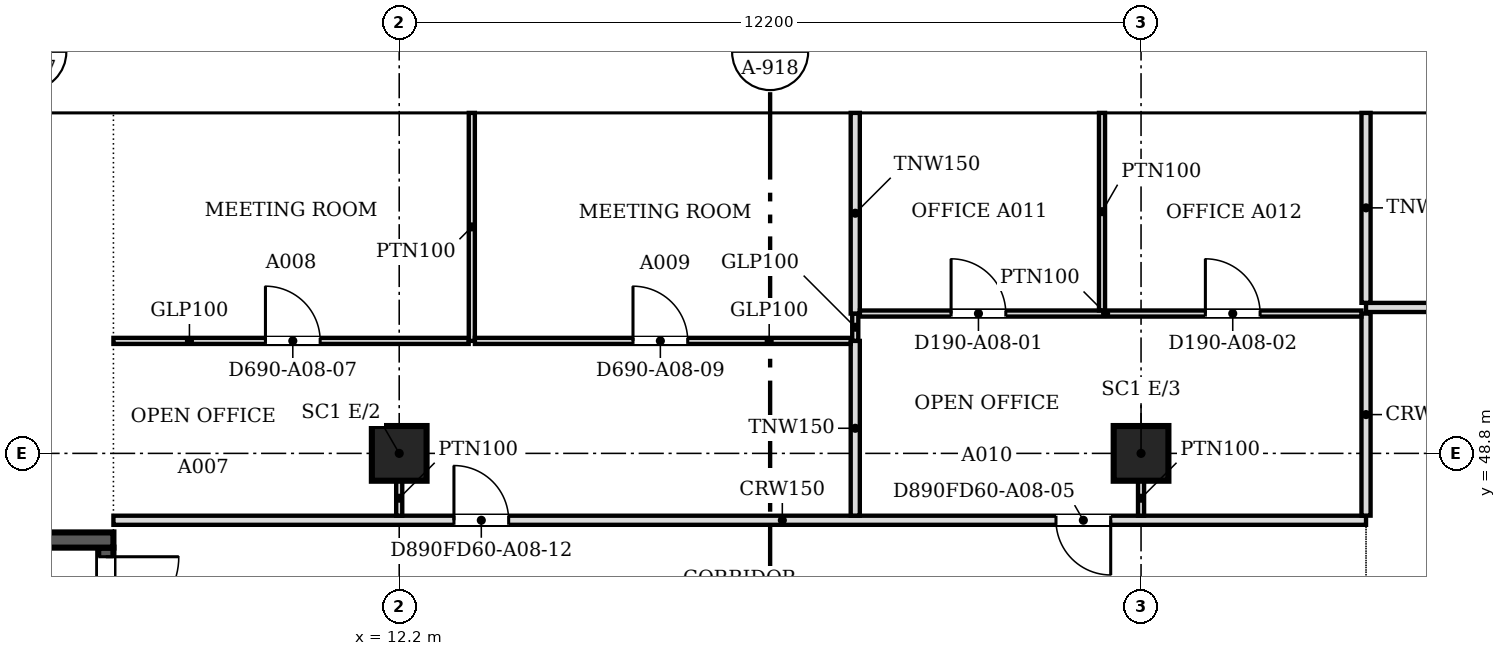
"""IFC4 building model, lengths in metres.
Left out: names, types, materials, properties, quantities, classifications, styles, units other than length and angle.
Written with IfcOpenShell. Run it as: python <this file> out.ifc"""

import sys

from ifc_helpers import new_model, si_unit, direction, frame, frame_2d, origin, origin_2d, place, context, subcontext, project, spatial, polyline, rectangle, outline, extrude, faceted_brep, source, transform, mapped, element, fill, save


model = new_model("IFC4")
c1 = context("Model", 3, precision=1e-05, world=origin(), true_north=direction((0.0, 1.0)))
c2 = subcontext(c1, "Body", "Model", "MODEL_VIEW")
j1 = project(units=[si_unit("LENGTHUNIT", "METRE"), si_unit("PLANEANGLEUNIT", "RADIAN")], contexts=[c1])
p1 = place(None, origin())
s1 = spatial("IfcSite", under=j1, at=p1, CompositionType="ELEMENT")
p2 = place(p1, origin())
s2 = spatial("IfcBuilding", under=s1, at=p2, CompositionType="ELEMENT")
p3 = place(p2, frame((0.0, 0.0, 95.2)))
s3 = spatial("IfcBuildingStorey", under=s2, at=p3, CompositionType="ELEMENT", Elevation=95.2)
for number, where, z_axis, x_axis in (
    (1, (12.2, 48.8, 0.0), (0.0, 0.0, 1.0), (1.0, 0.0, 0.0)),
    (2, (24.4, 48.8, 0.0), (0.0, 0.0, 1.0), (1.0, 0.0, 0.0)),
):
    element("IfcColumn", number, at=place(p3, frame(where, z_axis=z_axis, x_axis=x_axis)), inside=s3, PredefinedType="COLUMN", context=c2, shape_type="SweptSolid", body=[
        extrude(rectangle(XDim=0.9, YDim=0.9, at=origin_2d()), origin(), (0.0, 0.0, 1.0), 3.6),
    ])
m1 = source(origin(), c2, "Body", "SweptSolid", [
    extrude(outline(polyline([(3.05, 0.0), (6.1, 3.8), (3.05, 7.6), (0.0, 3.8), (3.05, 0.0)])), frame((0.0, 0.25, 0.0), z_axis=(0.0, -1.0, 0.0), x_axis=(1.0, 0.0, 0.0)), (0.0, 0.0, 1.0), 0.5),
])
p4 = place(p3, frame((30.5, 54.65, -3.8), z_axis=(0.0, 0.0, 1.0), x_axis=(-1.0, 0.0, 0.0)))
e3 = element("IfcWall", 3, at=p4, inside=s3, PredefinedType="SOLIDWALL", context=c2, shape_type="MappedRepresentation", body=[
    mapped(m1, transform((0.0, 0.0, 0.0), scale=1.0)),
])
m2 = source(origin(), c2, "Body", "SweptSolid", [
    extrude(outline(polyline([(3.05, 0.399), (5.78, 3.8), (3.05, 7.201), (0.321, 3.8), (3.05, 0.399)])), frame((0.0, 0.26, 0.0), z_axis=(0.0, -1.0, 0.0), x_axis=(1.0, 0.0, 0.0)), (0.0, 0.0, 1.0), 0.52),
])
p5 = place(p4, origin())
e4 = element("IfcOpeningElement", 4, at=p5, cuts=e3, PredefinedType="OPENING", context=c2, shape_type="MappedRepresentation", body=[
    mapped(m2, transform((0.0, 0.0, 0.0), scale=1.0)),
])
m3 = source(origin(), c2, "Body", "Brep", [
    faceted_brep([(3.05, -0.25, 0.0), (6.1, -0.25, 3.8), (6.1, -0.25, 3.8), (3.05, -0.25, 7.6), (0.0, -0.25, 3.8), (0.0, 0.25, 3.8), (3.05, 0.25, 7.6), (6.1, 0.25, 3.8), (6.1, 0.25, 3.8), (3.05, 0.25, 0.0)], [[[0, 1, 2, 3, 4]], [[5, 6, 7, 8, 9]], [[9, 8, 1, 0]], [[7, 6, 3, 2]], [[6, 5, 4, 3]], [[5, 9, 0, 4]], [[1, 8, 7, 2]]]),
])
p6 = place(p3, frame((24.4, 54.65, -3.8), z_axis=(0.0, 0.0, 1.0), x_axis=(-1.0, 0.0, 0.0)))
e5 = element("IfcWall", 5, at=p6, inside=s3, PredefinedType="SOLIDWALL", context=c2, shape_type="MappedRepresentation", body=[
    mapped(m3, transform((0.0, 0.0, 0.0), scale=1.0)),
])
p7 = place(p6, origin())
e6 = element("IfcOpeningElement", 6, at=p7, cuts=e5, PredefinedType="OPENING", context=c2, shape_type="MappedRepresentation", body=[
    mapped(m2, transform((0.0, 0.0, 0.0), scale=1.0)),
])
p8 = place(p3, frame((18.3, 54.65, -3.8), z_axis=(0.0, 0.0, 1.0), x_axis=(-1.0, 0.0, 0.0)))
e7 = element("IfcWall", 7, at=p8, inside=s3, PredefinedType="SOLIDWALL", context=c2, shape_type="MappedRepresentation", body=[
    mapped(m1, transform((0.0, 0.0, 0.0), scale=1.0)),
])
p9 = place(p8, origin())
e8 = element("IfcOpeningElement", 8, at=p9, cuts=e7, PredefinedType="OPENING", context=c2, shape_type="MappedRepresentation", body=[
    mapped(m2, transform((0.0, 0.0, 0.0), scale=1.0)),
])
m4 = source(origin(), c2, "Body", "Brep", [
    faceted_brep([(3.05, -0.25, 0.0), (6.053, -0.25, 3.8), (3.05, -0.25, 7.6), (0.0, -0.25, 3.8), (0.0, 0.25, 3.8), (3.05, 0.25, 7.6), (6.007, 0.25, 3.859), (6.007, 0.25, 3.741), (3.05, 0.25, 0.0), (6.053, 0.0, 3.8)], [[[0, 1, 2, 3]], [[4, 5, 6, 7, 8]], [[8, 7, 9, 1, 0]], [[6, 5, 2, 1, 9]], [[5, 4, 3, 2]], [[4, 8, 0, 3]], [[9, 7, 6]]]),
])
p10 = place(p3, frame((12.2, 54.65, -3.8), z_axis=(0.0, 0.0, 1.0), x_axis=(-1.0, 0.0, 0.0)))
e9 = element("IfcWall", 9, at=p10, inside=s3, PredefinedType="SOLIDWALL", context=c2, shape_type="MappedRepresentation", body=[
    mapped(m4, transform((0.0, 0.0, 0.0), scale=1.0)),
])
m5 = source(origin(), c2, "Body", "SweptSolid", [
    extrude(outline(polyline([(3.049, 0.401), (5.735, 3.8), (3.049, 7.199), (0.321, 3.8), (3.049, 0.401)])), frame((0.0, 0.26, 0.0), z_axis=(0.0, -1.0, 0.0), x_axis=(1.0, 0.0, 0.0)), (0.0, 0.0, 1.0), 0.52),
])
p11 = place(p10, origin())
e10 = element("IfcOpeningElement", 10, at=p11, cuts=e9, PredefinedType="OPENING", context=c2, shape_type="MappedRepresentation", body=[
    mapped(m5, transform((0.0, 0.0, 0.0), scale=1.0)),
])
p12 = place(p2, frame((0.0, 0.0, 99.0)))
s4 = spatial("IfcBuildingStorey", under=s2, at=p12, CompositionType="ELEMENT", Elevation=99.0)
p13 = place(p12, frame((33.55, 54.65, -3.8), z_axis=(0.0, 0.0, 1.0), x_axis=(-1.0, 0.0, 0.0)))
e11 = element("IfcWall", 11, at=p13, inside=s4, PredefinedType="SOLIDWALL", context=c2, shape_type="MappedRepresentation", body=[
    mapped(m1, transform((0.0, 0.0, 0.0), scale=1.0)),
])
p14 = place(p13, origin())
e12 = element("IfcOpeningElement", 12, at=p14, cuts=e11, PredefinedType="OPENING", context=c2, shape_type="MappedRepresentation", body=[
    mapped(m2, transform((0.0, 0.0, 0.0), scale=1.0)),
])
p15 = place(p12, frame((27.45, 54.65, -3.8), z_axis=(0.0, 0.0, 1.0), x_axis=(-1.0, 0.0, 0.0)))
e13 = element("IfcWall", 13, at=p15, inside=s4, PredefinedType="SOLIDWALL", context=c2, shape_type="MappedRepresentation", body=[
    mapped(m3, transform((0.0, 0.0, 0.0), scale=1.0)),
])
p16 = place(p15, origin())
e14 = element("IfcOpeningElement", 14, at=p16, cuts=e13, PredefinedType="OPENING", context=c2, shape_type="MappedRepresentation", body=[
    mapped(m2, transform((0.0, 0.0, 0.0), scale=1.0)),
])
p17 = place(p12, frame((21.35, 54.65, -3.8), z_axis=(0.0, 0.0, 1.0), x_axis=(-1.0, 0.0, 0.0)))
e15 = element("IfcWall", 15, at=p17, inside=s4, PredefinedType="SOLIDWALL", context=c2, shape_type="MappedRepresentation", body=[
    mapped(m1, transform((0.0, 0.0, 0.0), scale=1.0)),
])
p18 = place(p17, origin())
e16 = element("IfcOpeningElement", 16, at=p18, cuts=e15, PredefinedType="OPENING", context=c2, shape_type="MappedRepresentation", body=[
    mapped(m2, transform((0.0, 0.0, 0.0), scale=1.0)),
])
p19 = place(p12, frame((15.25, 54.65, -3.8), z_axis=(0.0, 0.0, 1.0), x_axis=(-1.0, 0.0, 0.0)))
e17 = element("IfcWall", 17, at=p19, inside=s4, PredefinedType="SOLIDWALL", context=c2, shape_type="MappedRepresentation", body=[
    mapped(m1, transform((0.0, 0.0, 0.0), scale=1.0)),
])
p20 = place(p19, origin())
e18 = element("IfcOpeningElement", 18, at=p20, cuts=e17, PredefinedType="OPENING", context=c2, shape_type="MappedRepresentation", body=[
    mapped(m2, transform((0.0, 0.0, 0.0), scale=1.0)),
])
m6 = source(origin(), c2, "Body", "Brep", [
    faceted_brep([(3.003, -0.25, 0.0), (3.05, -0.25, 0.06), (3.05, -0.25, 7.54), (3.003, -0.25, 7.6), (0.0, -0.25, 3.8), (0.0, 0.25, 3.8), (2.957, 0.25, 7.541), (2.957, 0.25, 0.059), (3.003, 0.0, 0.0), (3.003, 0.0, 7.6)], [[[0, 1, 2, 3, 4]], [[5, 6, 7]], [[1, 0, 8]], [[9, 3, 2]], [[6, 5, 4, 3, 9]], [[5, 7, 8, 0, 4]], [[1, 8, 7, 6, 9, 2]]]),
])
p21 = place(p12, frame((9.15, 54.65, -3.8), z_axis=(0.0, 0.0, 1.0), x_axis=(-1.0, 0.0, 0.0)))
e19 = element("IfcWall", 19, at=p21, inside=s4, PredefinedType="SOLIDWALL", context=c2, shape_type="MappedRepresentation", body=[
    mapped(m6, transform((0.0, 0.0, 0.0), scale=1.0)),
])
m7 = source(origin(), c2, "Body", "SweptSolid", [
    extrude(outline(polyline([(2.803, 6.944), (0.319, 3.8), (2.803, 0.656), (2.803, 6.944)])), frame((0.0, 0.26, 0.0), z_axis=(0.0, -1.0, 0.0), x_axis=(1.0, 0.0, 0.0)), (0.0, 0.0, 1.0), 0.52),
])
p22 = place(p21, origin())
e20 = element("IfcOpeningElement", 20, at=p22, cuts=e19, PredefinedType="OPENING", context=c2, shape_type="MappedRepresentation", body=[
    mapped(m7, transform((0.0, 0.0, 0.0), scale=1.0)),
])
p23 = place(p3, frame((3.6, 47.375, 0.0), z_axis=(0.0, 0.0, 1.0), x_axis=(1.0, 0.0, 0.0)))
e21 = element("IfcWall", 21, at=p23, inside=s3, PredefinedType="SOLIDWALL", context=c2, shape_type="SweptSolid", body=[
    extrude(rectangle(XDim=3.9, YDim=0.25, at=frame_2d((1.95, 0.0))), origin(), (0.0, 0.0, 1.0), 3.8),
])
p24 = place(p3, frame((7.375, 47.25, 0.0), z_axis=(0.0, 0.0, 1.0), x_axis=(0.0, -1.0, 0.0)))
e22 = element("IfcWall", 22, at=p24, inside=s3, PredefinedType="SOLIDWALL", context=c2, shape_type="SweptSolid", body=[
    extrude(rectangle(XDim=8.0, YDim=0.25, at=frame_2d((4.0, 0.0))), origin(), (0.0, 0.0, 1.0), 3.8),
])
m8 = source(origin(), c2, "Body", "SweptSolid", [
    extrude(rectangle(XDim=1.2, YDim=2.1, at=frame_2d((0.6, 1.05))), frame((0.0, 0.135, 0.0), z_axis=(0.0, -1.0, 0.0), x_axis=(1.0, 0.0, 0.0)), (0.0, 0.0, 1.0), 0.27),
])
p25 = place(p24, frame((0.15, 0.0, 0.0)))
e23 = element("IfcOpeningElement", 23, at=p25, cuts=e22, PredefinedType="OPENING", context=c2, shape_type="MappedRepresentation", body=[
    mapped(m8, transform((0.0, 0.0, 0.0), scale=1.0)),
])
p26 = place(p3, frame((7.5, 47.7, 0.0), z_axis=(0.0, 0.0, 1.0), x_axis=(1.0, 0.0, 0.0)))
e24 = element("IfcWall", 24, at=p26, inside=s3, PredefinedType="PARTITIONING", context=c2, shape_type="SweptSolid", body=[
    extrude(rectangle(XDim=20.6, YDim=0.15, at=frame_2d((10.3, 0.0))), origin(), (0.0, 0.0, 1.0), 3.067),
])
m9 = source(origin(), c2, "Body", "SweptSolid", [
    extrude(rectangle(XDim=0.9, YDim=2.1, at=frame_2d((0.45, 1.05))), frame((0.0, 0.085, 0.0), z_axis=(0.0, -1.0, 0.0), x_axis=(1.0, 0.0, 0.0)), (0.0, 0.0, 1.0), 0.17),
])
p27 = place(p26, frame((15.501, 0.0, 0.0)))
e25 = element("IfcOpeningElement", 25, at=p27, cuts=e24, PredefinedType="OPENING", context=c2, shape_type="MappedRepresentation", body=[
    mapped(m9, transform((0.0, 0.0, 0.0), scale=1.0)),
])
p28 = place(p26, frame((5.6, 0.0, 0.0)))
e26 = element("IfcOpeningElement", 26, at=p28, cuts=e24, PredefinedType="OPENING", context=c2, shape_type="MappedRepresentation", body=[
    mapped(m9, transform((0.0, 0.0, 0.0), scale=1.0)),
])
p29 = place(p3, frame((19.7, 47.776, 0.0), z_axis=(0.0, 0.0, 1.0), x_axis=(0.0, 1.0, 0.0)))
e27 = element("IfcWall", 27, at=p29, inside=s3, PredefinedType="PARTITIONING", context=c2, shape_type="SweptSolid", body=[
    extrude(rectangle(XDim=2.874, YDim=0.15, at=frame_2d((1.437, 0.0))), origin(), (0.0, 0.0, 1.0), 3.067),
])
p30 = place(p3, frame((28.1, 47.776, 0.0), z_axis=(0.0, 0.0, 1.0), x_axis=(0.0, 1.0, 0.0)))
e28 = element("IfcWall", 28, at=p30, inside=s3, PredefinedType="PARTITIONING", context=c2, shape_type="SweptSolid", body=[
    extrude(rectangle(XDim=3.324, YDim=0.15, at=frame_2d((1.662, 0.0))), origin(), (0.0, 0.0, 1.0), 3.067),
])
for number, where, z_axis, x_axis in (
    (29, (12.2, 48.35, 0.0), (0.0, 0.0, 1.0), (0.0, -1.0, 0.0)),
    (30, (24.4, 48.35, 0.0), (0.0, 0.0, 1.0), (0.0, -1.0, 0.0)),
):
    element("IfcWall", number, at=place(p3, frame(where, z_axis=z_axis, x_axis=x_axis)), inside=s3, PredefinedType="PARTITIONING", context=c2, shape_type="SweptSolid", body=[
        extrude(rectangle(XDim=0.575, YDim=0.1, at=frame_2d((0.288, 0.0))), origin(), (0.0, 0.0, 1.0), 3.067),
    ])
p31 = place(p3, frame((7.5, 50.65, 0.0), z_axis=(0.0, 0.0, 1.0), x_axis=(1.0, 0.0, 0.0)))
e31 = element("IfcWall", 31, at=p31, inside=s3, PredefinedType="PARTITIONING", context=c2, shape_type="SweptSolid", body=[
    extrude(rectangle(XDim=5.843, YDim=0.1, at=frame_2d((2.921, 0.0))), origin(), (0.0, 0.0, 1.0), 3.067),
])
m10 = source(origin(), c2, "Body", "SweptSolid", [
    extrude(rectangle(XDim=0.9, YDim=2.1, at=frame_2d((0.45, 1.05))), frame((0.0, 0.06, 0.0), z_axis=(0.0, -1.0, 0.0), x_axis=(1.0, 0.0, 0.0)), (0.0, 0.0, 1.0), 0.12),
])
p32 = place(p31, frame((2.5, 0.0, 0.0)))
e32 = element("IfcOpeningElement", 32, at=p32, cuts=e31, PredefinedType="OPENING", context=c2, shape_type="MappedRepresentation", body=[
    mapped(m10, transform((0.0, 0.0, 0.0), scale=1.0)),
])
p33 = place(p3, frame((13.394, 50.65, 0.0), z_axis=(0.0, 0.0, 1.0), x_axis=(0.0, 1.0, 0.0)))
e33 = element("IfcWall", 33, at=p33, inside=s3, PredefinedType="PARTITIONING", context=c2, shape_type="SweptSolid", body=[
    extrude(rectangle(XDim=3.75, YDim=0.1, at=frame_2d((1.875, 0.0))), origin(), (0.0, 0.0, 1.0), 3.067),
])
p34 = place(p3, frame((13.445, 50.65, 0.0), z_axis=(0.0, 0.0, 1.0), x_axis=(1.0, 0.0, 0.0)))
e34 = element("IfcWall", 34, at=p34, inside=s3, PredefinedType="PARTITIONING", context=c2, shape_type="SweptSolid", body=[
    extrude(rectangle(XDim=6.179, YDim=0.1, at=frame_2d((3.09, 0.0))), origin(), (0.0, 0.0, 1.0), 3.067),
])
p35 = place(p34, frame((2.6, 0.0, 0.0)))
e35 = element("IfcOpeningElement", 35, at=p35, cuts=e34, PredefinedType="OPENING", context=c2, shape_type="MappedRepresentation", body=[
    mapped(m10, transform((0.0, 0.0, 0.0), scale=1.0)),
])
p36 = place(p3, frame((19.7, 50.651, 0.0), z_axis=(0.0, 0.0, 1.0), x_axis=(0.0, 1.0, 0.0)))
e36 = element("IfcWall", 36, at=p36, inside=s3, PredefinedType="PARTITIONING", context=c2, shape_type="SweptSolid", body=[
    extrude(rectangle(XDim=0.448, YDim=0.1, at=frame_2d((0.224, 0.0))), origin(), (0.0, 0.0, 1.0), 3.067),
])
p37 = place(p3, frame((19.7, 51.1, 0.0), z_axis=(0.0, 0.0, 1.0), x_axis=(0.0, 1.0, 0.0)))
e37 = element("IfcWall", 37, at=p37, inside=s3, PredefinedType="PARTITIONING", context=c2, shape_type="SweptSolid", body=[
    extrude(rectangle(XDim=3.3, YDim=0.15, at=frame_2d((1.65, 0.0))), origin(), (0.0, 0.0, 1.0), 3.067),
])
p38 = place(p3, frame((19.776, 51.1, 0.0), z_axis=(0.0, 0.0, 1.0), x_axis=(1.0, 0.0, 0.0)))
e38 = element("IfcWall", 38, at=p38, inside=s3, PredefinedType="PARTITIONING", context=c2, shape_type="SweptSolid", body=[
    extrude(rectangle(XDim=8.248, YDim=0.1, at=frame_2d((4.124, 0.0))), origin(), (0.0, 0.0, 1.0), 3.067),
])
p39 = place(p38, frame((1.5, 0.0, 0.0)))
e39 = element("IfcOpeningElement", 39, at=p39, cuts=e38, PredefinedType="OPENING", context=c2, shape_type="MappedRepresentation", body=[
    mapped(m10, transform((0.0, 0.0, 0.0), scale=1.0)),
])
p40 = place(p38, frame((5.682, 0.0, 0.0)))
e40 = element("IfcOpeningElement", 40, at=p40, cuts=e38, PredefinedType="OPENING", context=c2, shape_type="MappedRepresentation", body=[
    mapped(m10, transform((0.0, 0.0, 0.0), scale=1.0)),
])
p41 = place(p3, frame((23.758, 51.151, 0.0), z_axis=(0.0, 0.0, 1.0), x_axis=(0.0, 1.0, 0.0)))
e41 = element("IfcWall", 41, at=p41, inside=s3, PredefinedType="PARTITIONING", context=c2, shape_type="SweptSolid", body=[
    extrude(rectangle(XDim=3.249, YDim=0.1, at=frame_2d((1.625, 0.0))), origin(), (0.0, 0.0, 1.0), 3.067),
])
p42 = place(p3, frame((28.1, 51.2, 0.0), z_axis=(0.0, 0.0, 1.0), x_axis=(1.0, 0.0, 0.0)))
e42 = element("IfcWall", 42, at=p42, inside=s3, PredefinedType="PARTITIONING", context=c2, shape_type="SweptSolid", body=[
    extrude(rectangle(XDim=31.438, YDim=0.15, at=frame_2d((15.719, 0.0))), origin(), (0.0, 0.0, 1.0), 3.067),
])
p43 = place(p42, frame((13.251, 0.0, 0.0)))
e43 = element("IfcOpeningElement", 43, at=p43, cuts=e42, PredefinedType="OPENING", context=c2, shape_type="MappedRepresentation", body=[
    mapped(m9, transform((0.0, 0.0, 0.0), scale=1.0)),
])
p44 = place(p42, frame((4.1, 0.0, 0.0)))
e44 = element("IfcOpeningElement", 44, at=p44, cuts=e42, PredefinedType="OPENING", context=c2, shape_type="MappedRepresentation", body=[
    mapped(m9, transform((0.0, 0.0, 0.0), scale=1.0)),
])
p45 = place(p42, frame((24.4, 0.0, 0.0)))
e45 = element("IfcOpeningElement", 45, at=p45, cuts=e42, PredefinedType="OPENING", context=c2, shape_type="MappedRepresentation", body=[
    mapped(m9, transform((0.0, 0.0, 0.0), scale=1.0)),
])
p46 = place(p3, frame((28.1, 51.276, 0.0), z_axis=(0.0, 0.0, 1.0), x_axis=(0.0, 1.0, 0.0)))
e46 = element("IfcWall", 46, at=p46, inside=s3, PredefinedType="PARTITIONING", context=c2, shape_type="SweptSolid", body=[
    extrude(rectangle(XDim=3.124, YDim=0.15, at=frame_2d((1.562, 0.0))), origin(), (0.0, 0.0, 1.0), 3.067),
])
m11 = source(origin(), c2, "Body", "SweptSolid", [
    extrude(rectangle(XDim=1.2, YDim=2.1, at=frame_2d((0.6, 1.05))), frame((0.0, 0.025, 0.0), z_axis=(0.0, -1.0, 0.0), x_axis=(1.0, 0.0, 0.0)), (0.0, 0.0, 1.0), 0.05),
])
p47 = place(p25, origin())
e47 = element("IfcDoor", 47, at=p47, inside=s3, OperationType="SINGLE_SWING_LEFT", PredefinedType="DOOR", context=c2, shape_type="MappedRepresentation", body=[
    mapped(m11, transform((0.0, 0.0, 0.0), scale=1.0)),
])
fill(e23, e47)
m12 = source(origin(), c2, "Body", "SweptSolid", [
    extrude(rectangle(XDim=0.9, YDim=2.1, at=frame_2d((0.45, 1.05))), frame((0.0, 0.025, 0.0), z_axis=(0.0, -1.0, 0.0), x_axis=(1.0, 0.0, 0.0)), (0.0, 0.0, 1.0), 0.05),
])
p48 = place(p39, origin())
e48 = element("IfcDoor", 48, at=p48, inside=s3, OperationType="SINGLE_SWING_LEFT", PredefinedType="DOOR", context=c2, shape_type="MappedRepresentation", body=[
    mapped(m12, transform((0.0, 0.0, 0.0), scale=1.0)),
])
fill(e39, e48)
p49 = place(p40, origin())
e49 = element("IfcDoor", 49, at=p49, inside=s3, OperationType="SINGLE_SWING_LEFT", PredefinedType="DOOR", context=c2, shape_type="MappedRepresentation", body=[
    mapped(m12, transform((0.0, 0.0, 0.0), scale=1.0)),
])
fill(e40, e49)
p50 = place(p32, origin())
e50 = element("IfcDoor", 50, at=p50, inside=s3, OperationType="SINGLE_SWING_LEFT", PredefinedType="DOOR", context=c2, shape_type="MappedRepresentation", body=[
    mapped(m12, transform((0.0, 0.0, 0.0), scale=1.0)),
])
fill(e32, e50)
p51 = place(p35, origin())
e51 = element("IfcDoor", 51, at=p51, inside=s3, OperationType="SINGLE_SWING_LEFT", PredefinedType="DOOR", context=c2, shape_type="MappedRepresentation", body=[
    mapped(m12, transform((0.0, 0.0, 0.0), scale=1.0)),
])
fill(e35, e51)
p52 = place(p27, origin())
e52 = element("IfcDoor", 52, at=p52, inside=s3, OperationType="SINGLE_SWING_RIGHT", PredefinedType="DOOR", context=c2, shape_type="MappedRepresentation", body=[
    mapped(m12, transform((0.0, 0.0, 0.0), scale=1.0)),
])
fill(e25, e52)
p53 = place(p28, origin())
e53 = element("IfcDoor", 53, at=p53, inside=s3, OperationType="SINGLE_SWING_LEFT", PredefinedType="DOOR", context=c2, shape_type="MappedRepresentation", body=[
    mapped(m12, transform((0.0, 0.0, 0.0), scale=1.0)),
])
fill(e26, e53)
save(model, sys.argv[1])
